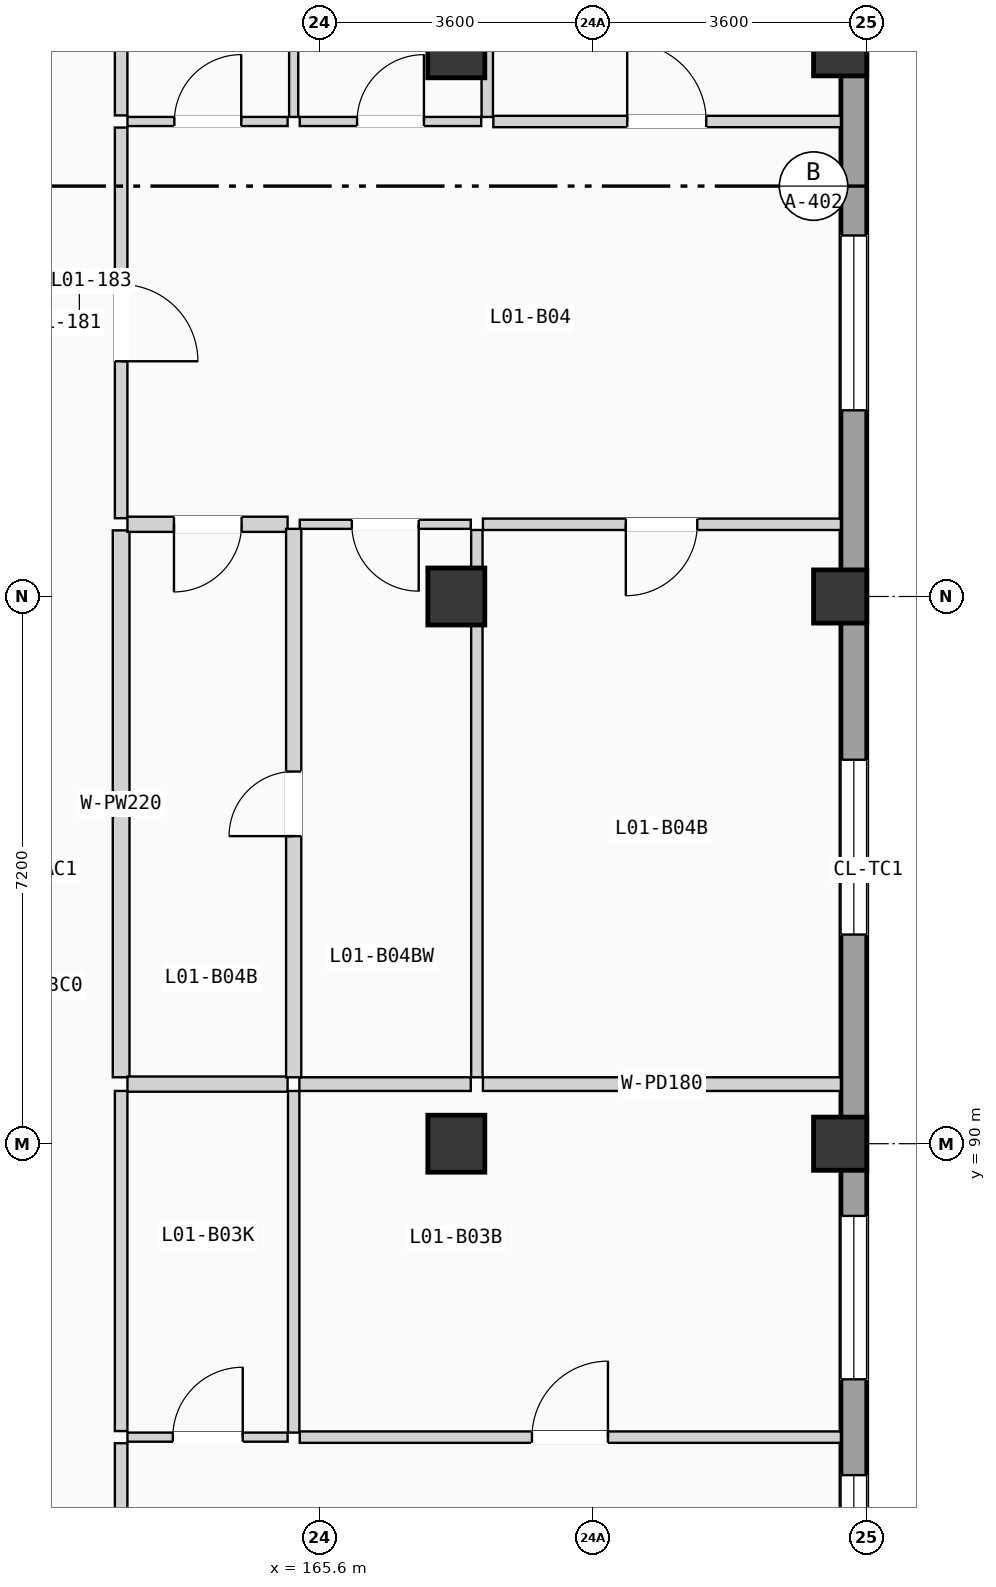
"""IFC4 building model, lengths in metres.
Left out: names, types, materials, properties, quantities, classifications, styles, units other than length and angle.
Written with IfcOpenShell. Run it as: python <this file> out.ifc"""

import sys

from ifc_helpers import new_model, si_unit, direction, frame, frame_2d, origin, origin_2d, place, context, subcontext, project, spatial, rectangle, extrude, element, fill, save


model = new_model("IFC4")
c1 = context("Model", 3, precision=1e-05, world=origin(), true_north=direction((0.0, 1.0)))
c2 = subcontext(c1, "Body", "Model", "MODEL_VIEW")
j1 = project(units=[si_unit("LENGTHUNIT", "METRE"), si_unit("PLANEANGLEUNIT", "RADIAN")], contexts=[c1])
p1 = place(None, origin())
s1 = spatial("IfcSite", under=j1, at=p1, CompositionType="ELEMENT")
p2 = place(p1, origin())
s2 = spatial("IfcBuilding", under=s1, at=p2, CompositionType="ELEMENT")
p3 = place(p2, frame((0.0, 0.0, 4.9)))
s3 = spatial("IfcBuildingStorey", under=s2, at=p3, CompositionType="ELEMENT", Elevation=4.9)
for number, where, z_axis, x_axis in (
    (1, (167.4, 90.0, 0.0), (0.0, 0.0, 1.0), (1.0, 0.0, 0.0)),
    (2, (167.4, 97.2, 0.0), (0.0, 0.0, 1.0), (1.0, 0.0, 0.0)),
    (3, (167.4, 104.4, 0.0), (0.0, 0.0, 1.0), (1.0, 0.0, 0.0)),
):
    element("IfcColumn", number, at=place(p3, frame(where, z_axis=z_axis, x_axis=x_axis)), inside=s3, PredefinedType="COLUMN", context=c2, shape_type="SweptSolid", body=[
        extrude(rectangle(XDim=0.75, YDim=0.75, at=origin_2d()), origin(), (0.0, 0.0, 1.0), 3.675),
    ])
for number, where, z_axis, x_axis in (
    (4, (172.45, 90.0, 0.0), (0.0, 0.0, 1.0), (1.0, 0.0, 0.0)),
    (5, (172.45, 97.2, 0.0), (0.0, 0.0, 1.0), (1.0, 0.0, 0.0)),
    (6, (172.45, 104.4, 0.0), (0.0, 0.0, 1.0), (1.0, 0.0, 0.0)),
):
    element("IfcColumn", number, at=place(p3, frame(where, z_axis=z_axis, x_axis=x_axis)), inside=s3, PredefinedType="COLUMN", context=c2, shape_type="SweptSolid", body=[
        extrude(rectangle(XDim=0.7, YDim=0.7, at=origin_2d()), origin(), (0.0, 0.0, 1.0), 3.675),
    ])
p4 = place(p3, frame((172.63, 68.74, 0.0), z_axis=(0.0, 0.0, 1.0), x_axis=(0.0, 1.0, 0.0)))
e7 = element("IfcWall", 7, at=p4, inside=s3, PredefinedType="SOLIDWALL", context=c2, shape_type="SweptSolid", body=[
    extrude(rectangle(XDim=49.72, YDim=0.34, at=frame_2d((24.86, 0.0))), origin(), (0.0, 0.0, 1.0), 3.415),
])
p5 = place(p4, frame((14.749, 0.0, 0.9)))
e8 = element("IfcOpeningElement", 8, at=p5, cuts=e7, PredefinedType="OPENING", context=c2, shape_type="SweptSolid", body=[
    extrude(rectangle(XDim=2.15, YDim=1.5, at=frame_2d((1.075, 0.75))), frame((0.0, 0.18, 0.0), z_axis=(0.0, -1.0, 0.0), x_axis=(1.0, 0.0, 0.0)), (0.0, 0.0, 1.0), 0.36),
])
p6 = place(p4, frame((8.422, 0.0, 0.9)))
e9 = element("IfcOpeningElement", 9, at=p6, cuts=e7, PredefinedType="OPENING", context=c2, shape_type="SweptSolid", body=[
    extrude(rectangle(XDim=2.15, YDim=1.65, at=frame_2d((1.075, 0.825))), frame((0.0, 0.18, 0.0), z_axis=(0.0, -1.0, 0.0), x_axis=(1.0, 0.0, 0.0)), (0.0, 0.0, 1.0), 0.36),
])
p7 = place(p4, frame((18.16, 0.0, 0.9)))
e10 = element("IfcOpeningElement", 10, at=p7, cuts=e7, PredefinedType="OPENING", context=c2, shape_type="SweptSolid", body=[
    extrude(rectangle(XDim=2.15, YDim=1.8, at=frame_2d((1.075, 0.9))), frame((0.0, 0.18, 0.0), z_axis=(0.0, -1.0, 0.0), x_axis=(1.0, 0.0, 0.0)), (0.0, 0.0, 1.0), 0.36),
])
p8 = place(p4, frame((30.91, 0.0, 0.9)))
e11 = element("IfcOpeningElement", 11, at=p8, cuts=e7, PredefinedType="OPENING", context=c2, shape_type="SweptSolid", body=[
    extrude(rectangle(XDim=2.3, YDim=1.2, at=frame_2d((1.15, 0.6))), frame((0.0, 0.18, 0.0), z_axis=(0.0, -1.0, 0.0), x_axis=(1.0, 0.0, 0.0)), (0.0, 0.0, 1.0), 0.36),
])
p9 = place(p4, frame((24.012, 0.0, 0.9)))
e12 = element("IfcOpeningElement", 12, at=p9, cuts=e7, PredefinedType="OPENING", context=c2, shape_type="SweptSolid", body=[
    extrude(rectangle(XDim=2.3, YDim=1.35, at=frame_2d((1.15, 0.675))), frame((0.0, 0.18, 0.0), z_axis=(0.0, -1.0, 0.0), x_axis=(1.0, 0.0, 0.0)), (0.0, 0.0, 1.0), 0.36),
])
p10 = place(p4, frame((38.045, 0.0, 0.9)))
e13 = element("IfcOpeningElement", 13, at=p10, cuts=e7, PredefinedType="OPENING", context=c2, shape_type="SweptSolid", body=[
    extrude(rectangle(XDim=2.3, YDim=1.5, at=frame_2d((1.15, 0.75))), frame((0.0, 0.18, 0.0), z_axis=(0.0, -1.0, 0.0), x_axis=(1.0, 0.0, 0.0)), (0.0, 0.0, 1.0), 0.36),
])
p11 = place(p3, frame((162.99, 80.635, 0.0), z_axis=(0.0, 0.0, 1.0), x_axis=(0.0, 1.0, 0.0)))
e14 = element("IfcWall", 14, at=p11, inside=s3, PredefinedType="PARTITIONING", context=c2, shape_type="SweptSolid", body=[
    extrude(rectangle(XDim=5.424, YDim=0.165, at=frame_2d((2.712, 0.0))), origin(), (0.0, 0.0, 1.0), 3.395),
])
p12 = place(p11, frame((2.207, 0.0, 0.0)))
e15 = element("IfcOpeningElement", 15, at=p12, cuts=e14, PredefinedType="OPENING", context=c2, shape_type="SweptSolid", body=[
    extrude(rectangle(XDim=1.01, YDim=2.11, at=frame_2d((0.505, 1.055))), frame((0.0, 0.093, 0.0), z_axis=(0.0, -1.0, 0.0), x_axis=(1.0, 0.0, 0.0)), (0.0, 0.0, 1.0), 0.185),
])
p13 = place(p3, frame((162.99, 86.219, 0.0), z_axis=(0.0, 0.0, 1.0), x_axis=(0.0, 1.0, 0.0)))
e16 = element("IfcWall", 16, at=p13, inside=s3, PredefinedType="PARTITIONING", context=c2, shape_type="SweptSolid", body=[
    extrude(rectangle(XDim=4.475, YDim=0.165, at=frame_2d((2.238, 0.0))), origin(), (0.0, 0.0, 1.0), 3.395),
])
p14 = place(p3, frame((162.99, 98.23, 0.0), z_axis=(0.0, 0.0, 1.0), x_axis=(0.0, 1.0, 0.0)))
e17 = element("IfcWall", 17, at=p14, inside=s3, PredefinedType="PARTITIONING", context=c2, shape_type="SweptSolid", body=[
    extrude(rectangle(XDim=5.14, YDim=0.165, at=frame_2d((2.57, 0.0))), origin(), (0.0, 0.0, 1.0), 3.395),
])
p15 = place(p14, frame((2.065, 0.0, 0.0)))
e18 = element("IfcOpeningElement", 18, at=p15, cuts=e17, PredefinedType="OPENING", context=c2, shape_type="SweptSolid", body=[
    extrude(rectangle(XDim=1.01, YDim=2.11, at=frame_2d((0.505, 1.055))), frame((0.0, 0.093, 0.0), z_axis=(0.0, -1.0, 0.0), x_axis=(1.0, 0.0, 0.0)), (0.0, 0.0, 1.0), 0.185),
])
p16 = place(p3, frame((162.99, 90.874, 0.0), z_axis=(0.0, 0.0, 1.0), x_axis=(0.0, 1.0, 0.0)))
e19 = element("IfcWall", 19, at=p16, inside=s3, PredefinedType="PLUMBINGWALL", context=c2, shape_type="SweptSolid", body=[
    extrude(rectangle(XDim=7.196, YDim=0.22, at=frame_2d((3.598, 0.0))), origin(), (0.0, 0.0, 1.0), 3.395),
])
p17 = place(p3, frame((162.99, 103.53, 0.0), z_axis=(0.0, 0.0, 1.0), x_axis=(0.0, 1.0, 0.0)))
e20 = element("IfcWall", 20, at=p17, inside=s3, PredefinedType="PARTITIONING", context=c2, shape_type="SweptSolid", body=[
    extrude(rectangle(XDim=7.67, YDim=0.165, at=frame_2d((3.835, 0.0))), origin(), (0.0, 0.0, 1.0), 3.395),
])
p18 = place(p3, frame((163.073, 86.139, 0.0), z_axis=(0.0, 0.0, 1.0), x_axis=(1.0, 0.0, 0.0)))
e21 = element("IfcWall", 21, at=p18, inside=s3, PredefinedType="PARTITIONING", context=c2, shape_type="SweptSolid", body=[
    extrude(rectangle(XDim=2.107, YDim=0.12, at=frame_2d((1.053, 0.0))), origin(), (0.0, 0.0, 1.0), 3.395),
])
p19 = place(p18, frame((0.597, 0.0, 0.0)))
e22 = element("IfcOpeningElement", 22, at=p19, cuts=e21, PredefinedType="OPENING", context=c2, shape_type="SweptSolid", body=[
    extrude(rectangle(XDim=0.92, YDim=2.02, at=frame_2d((0.46, 1.01))), frame((0.0, 0.07, 0.0), z_axis=(0.0, -1.0, 0.0), x_axis=(1.0, 0.0, 0.0)), (0.0, 0.0, 1.0), 0.14),
])
p20 = place(p3, frame((165.34, 86.139, 0.0), z_axis=(0.0, 0.0, 1.0), x_axis=(1.0, 0.0, 0.0)))
e23 = element("IfcWall", 23, at=p20, inside=s3, PredefinedType="PARTITIONING", context=c2, shape_type="SweptSolid", body=[
    extrude(rectangle(XDim=7.12, YDim=0.15, at=frame_2d((3.56, 0.0))), origin(), (0.0, 0.0, 1.0), 3.395),
])
p21 = place(p20, frame((3.055, 0.0, 0.0)))
e24 = element("IfcOpeningElement", 24, at=p21, cuts=e23, PredefinedType="OPENING", context=c2, shape_type="SweptSolid", body=[
    extrude(rectangle(XDim=1.0, YDim=2.06, at=frame_2d((0.5, 1.03))), frame((0.0, 0.085, 0.0), z_axis=(0.0, -1.0, 0.0), x_axis=(1.0, 0.0, 0.0)), (0.0, 0.0, 1.0), 0.17),
])
p22 = place(p3, frame((165.26, 86.199, 0.0), z_axis=(0.0, 0.0, 1.0), x_axis=(0.0, 1.0, 0.0)))
e25 = element("IfcWall", 25, at=p22, inside=s3, PredefinedType="PARTITIONING", context=c2, shape_type="SweptSolid", body=[
    extrude(rectangle(XDim=4.495, YDim=0.15, at=frame_2d((2.248, 0.0))), origin(), (0.0, 0.0, 1.0), 3.395),
])
p23 = place(p3, frame((163.073, 90.784, 0.0), z_axis=(0.0, 0.0, 1.0), x_axis=(1.0, 0.0, 0.0)))
e26 = element("IfcWall", 26, at=p23, inside=s3, PredefinedType="PLUMBINGWALL", context=c2, shape_type="SweptSolid", body=[
    extrude(rectangle(XDim=2.107, YDim=0.2, at=frame_2d((1.053, 0.0))), origin(), (0.0, 0.0, 1.0), 3.395),
])
p24 = place(p3, frame((167.75, 90.784, 0.0), z_axis=(0.0, 0.0, 1.0), x_axis=(1.0, 0.0, 0.0)))
e27 = element("IfcWall", 27, at=p24, inside=s3, PredefinedType="PARTITIONING", context=c2, shape_type="SweptSolid", body=[
    extrude(rectangle(XDim=4.71, YDim=0.18, at=frame_2d((2.355, 0.0))), origin(), (0.0, 0.0, 1.0), 3.395),
])
p25 = place(p3, frame((165.335, 90.784, 0.0), z_axis=(0.0, 0.0, 1.0), x_axis=(1.0, 0.0, 0.0)))
e28 = element("IfcWall", 28, at=p25, inside=s3, PredefinedType="PARTITIONING", context=c2, shape_type="SweptSolid", body=[
    extrude(rectangle(XDim=2.255, YDim=0.18, at=frame_2d((1.127, 0.0))), origin(), (0.0, 0.0, 1.0), 3.395),
])
p26 = place(p3, frame((163.073, 98.15, 0.0), z_axis=(0.0, 0.0, 1.0), x_axis=(1.0, 0.0, 0.0)))
e29 = element("IfcWall", 29, at=p26, inside=s3, PredefinedType="PLUMBINGWALL", context=c2, shape_type="SweptSolid", body=[
    extrude(rectangle(XDim=2.107, YDim=0.2, at=frame_2d((1.053, 0.0))), origin(), (0.0, 0.0, 1.0), 3.395),
])
p27 = place(p26, frame((0.612, 0.0, 0.0)))
e30 = element("IfcOpeningElement", 30, at=p27, cuts=e29, PredefinedType="OPENING", context=c2, shape_type="SweptSolid", body=[
    extrude(rectangle(XDim=0.89, YDim=2.03, at=frame_2d((0.445, 1.015))), frame((0.0, 0.11, 0.0), z_axis=(0.0, -1.0, 0.0), x_axis=(1.0, 0.0, 0.0)), (0.0, 0.0, 1.0), 0.22),
])
p28 = place(p3, frame((163.073, 103.45, 0.0), z_axis=(0.0, 0.0, 1.0), x_axis=(1.0, 0.0, 0.0)))
e31 = element("IfcWall", 31, at=p28, inside=s3, PredefinedType="PARTITIONING", context=c2, shape_type="SweptSolid", body=[
    extrude(rectangle(XDim=2.107, YDim=0.12, at=frame_2d((1.053, 0.0))), origin(), (0.0, 0.0, 1.0), 3.395),
])
p29 = place(p28, frame((0.617, 0.0, 0.0)))
e32 = element("IfcOpeningElement", 32, at=p29, cuts=e31, PredefinedType="OPENING", context=c2, shape_type="SweptSolid", body=[
    extrude(rectangle(XDim=0.88, YDim=2.02, at=frame_2d((0.44, 1.01))), frame((0.0, 0.07, 0.0), z_axis=(0.0, -1.0, 0.0), x_axis=(1.0, 0.0, 0.0)), (0.0, 0.0, 1.0), 0.14),
])
p30 = place(p3, frame((167.75, 98.15, 0.0), z_axis=(0.0, 0.0, 1.0), x_axis=(1.0, 0.0, 0.0)))
e33 = element("IfcWall", 33, at=p30, inside=s3, PredefinedType="PARTITIONING", context=c2, shape_type="SweptSolid", body=[
    extrude(rectangle(XDim=4.71, YDim=0.15, at=frame_2d((2.355, 0.0))), origin(), (0.0, 0.0, 1.0), 3.395),
])
p31 = place(p30, frame((1.88, 0.0, 0.0)))
e34 = element("IfcOpeningElement", 34, at=p31, cuts=e33, PredefinedType="OPENING", context=c2, shape_type="SweptSolid", body=[
    extrude(rectangle(XDim=0.94, YDim=2.06, at=frame_2d((0.47, 1.03))), frame((0.0, 0.085, 0.0), z_axis=(0.0, -1.0, 0.0), x_axis=(1.0, 0.0, 0.0)), (0.0, 0.0, 1.0), 0.17),
])
p32 = place(p3, frame((165.34, 98.15, 0.0), z_axis=(0.0, 0.0, 1.0), x_axis=(1.0, 0.0, 0.0)))
e35 = element("IfcWall", 35, at=p32, inside=s3, PredefinedType="PARTITIONING", context=c2, shape_type="SweptSolid", body=[
    extrude(rectangle(XDim=2.25, YDim=0.12, at=frame_2d((1.125, 0.0))), origin(), (0.0, 0.0, 1.0), 3.395),
])
p33 = place(p32, frame((0.685, 0.0, 0.0)))
e36 = element("IfcOpeningElement", 36, at=p33, cuts=e35, PredefinedType="OPENING", context=c2, shape_type="SweptSolid", body=[
    extrude(rectangle(XDim=0.88, YDim=2.02, at=frame_2d((0.44, 1.01))), frame((0.0, 0.07, 0.0), z_axis=(0.0, -1.0, 0.0), x_axis=(1.0, 0.0, 0.0)), (0.0, 0.0, 1.0), 0.14),
])
p34 = place(p3, frame((167.887, 103.45, 0.0), z_axis=(0.0, 0.0, 1.0), x_axis=(1.0, 0.0, 0.0)))
e37 = element("IfcWall", 37, at=p34, inside=s3, PredefinedType="PARTITIONING", context=c2, shape_type="SweptSolid", body=[
    extrude(rectangle(XDim=4.573, YDim=0.15, at=frame_2d((2.287, 0.0))), origin(), (0.0, 0.0, 1.0), 3.395),
])
p35 = place(p34, frame((1.761, 0.0, 0.0)))
e38 = element("IfcOpeningElement", 38, at=p35, cuts=e37, PredefinedType="OPENING", context=c2, shape_type="SweptSolid", body=[
    extrude(rectangle(XDim=1.04, YDim=2.08, at=frame_2d((0.52, 1.04))), frame((0.0, 0.085, 0.0), z_axis=(0.0, -1.0, 0.0), x_axis=(1.0, 0.0, 0.0)), (0.0, 0.0, 1.0), 0.17),
])
p36 = place(p3, frame((165.34, 103.45, 0.0), z_axis=(0.0, 0.0, 1.0), x_axis=(1.0, 0.0, 0.0)))
e39 = element("IfcWall", 39, at=p36, inside=s3, PredefinedType="PARTITIONING", context=c2, shape_type="SweptSolid", body=[
    extrude(rectangle(XDim=2.387, YDim=0.12, at=frame_2d((1.193, 0.0))), origin(), (0.0, 0.0, 1.0), 3.395),
])
p37 = place(p36, frame((0.754, 0.0, 0.0)))
e40 = element("IfcOpeningElement", 40, at=p37, cuts=e39, PredefinedType="OPENING", context=c2, shape_type="SweptSolid", body=[
    extrude(rectangle(XDim=0.88, YDim=2.02, at=frame_2d((0.44, 1.01))), frame((0.0, 0.07, 0.0), z_axis=(0.0, -1.0, 0.0), x_axis=(1.0, 0.0, 0.0)), (0.0, 0.0, 1.0), 0.14),
])
p38 = place(p3, frame((165.26, 90.874, 0.0), z_axis=(0.0, 0.0, 1.0), x_axis=(0.0, 1.0, 0.0)))
e41 = element("IfcWall", 41, at=p38, inside=s3, PredefinedType="PLUMBINGWALL", context=c2, shape_type="SweptSolid", body=[
    extrude(rectangle(XDim=7.216, YDim=0.2, at=frame_2d((3.608, 0.0))), origin(), (0.0, 0.0, 1.0), 3.395),
])
p39 = place(p38, frame((3.173, 0.0, 0.0)))
e42 = element("IfcOpeningElement", 42, at=p39, cuts=e41, PredefinedType="OPENING", context=c2, shape_type="SweptSolid", body=[
    extrude(rectangle(XDim=0.85, YDim=2.01, at=frame_2d((0.425, 1.005))), frame((0.0, 0.11, 0.0), z_axis=(0.0, -1.0, 0.0), x_axis=(1.0, 0.0, 0.0)), (0.0, 0.0, 1.0), 0.22),
])
p40 = place(p3, frame((165.26, 103.51, 0.0), z_axis=(0.0, 0.0, 1.0), x_axis=(0.0, 1.0, 0.0)))
e43 = element("IfcWall", 43, at=p40, inside=s3, PredefinedType="PARTITIONING", context=c2, shape_type="SweptSolid", body=[
    extrude(rectangle(XDim=7.69, YDim=0.12, at=frame_2d((3.845, 0.0))), origin(), (0.0, 0.0, 1.0), 3.395),
])
p41 = place(p3, frame((167.67, 90.874, 0.0), z_axis=(0.0, 0.0, 1.0), x_axis=(0.0, 1.0, 0.0)))
e44 = element("IfcWall", 44, at=p41, inside=s3, PredefinedType="PARTITIONING", context=c2, shape_type="SweptSolid", body=[
    extrude(rectangle(XDim=7.201, YDim=0.15, at=frame_2d((3.601, 0.0))), origin(), (0.0, 0.0, 1.0), 3.395),
])
p42 = place(p3, frame((167.807, 103.51, 0.0), z_axis=(0.0, 0.0, 1.0), x_axis=(0.0, 1.0, 0.0)))
e45 = element("IfcWall", 45, at=p42, inside=s3, PredefinedType="PARTITIONING", context=c2, shape_type="SweptSolid", body=[
    extrude(rectangle(XDim=7.69, YDim=0.15, at=frame_2d((3.845, 0.0))), origin(), (0.0, 0.0, 1.0), 3.395),
])
p43 = place(p5, origin())
e46 = element("IfcWindow", 46, at=p43, inside=s3, PartitioningType="DOUBLE_PANEL_VERTICAL", PredefinedType="WINDOW", context=c2, shape_type="SweptSolid", body=[
    extrude(rectangle(XDim=2.15, YDim=1.5, at=frame_2d((1.075, 0.75))), frame((0.0, 0.03, 0.0), z_axis=(0.0, -1.0, 0.0), x_axis=(1.0, 0.0, 0.0)), (0.0, 0.0, 1.0), 0.06),
])
fill(e8, e46)
p44 = place(p7, origin())
e47 = element("IfcWindow", 47, at=p44, inside=s3, PartitioningType="DOUBLE_PANEL_VERTICAL", PredefinedType="WINDOW", context=c2, shape_type="SweptSolid", body=[
    extrude(rectangle(XDim=2.15, YDim=1.8, at=frame_2d((1.075, 0.9))), frame((0.0, 0.03, 0.0), z_axis=(0.0, -1.0, 0.0), x_axis=(1.0, 0.0, 0.0)), (0.0, 0.0, 1.0), 0.06),
])
fill(e10, e47)
p45 = place(p8, origin())
e48 = element("IfcWindow", 48, at=p45, inside=s3, PartitioningType="DOUBLE_PANEL_VERTICAL", PredefinedType="WINDOW", context=c2, shape_type="SweptSolid", body=[
    extrude(rectangle(XDim=2.3, YDim=1.2, at=frame_2d((1.15, 0.6))), frame((0.0, 0.03, 0.0), z_axis=(0.0, -1.0, 0.0), x_axis=(1.0, 0.0, 0.0)), (0.0, 0.0, 1.0), 0.06),
])
fill(e11, e48)
p46 = place(p9, origin())
e49 = element("IfcWindow", 49, at=p46, inside=s3, PartitioningType="DOUBLE_PANEL_VERTICAL", PredefinedType="WINDOW", context=c2, shape_type="SweptSolid", body=[
    extrude(rectangle(XDim=2.3, YDim=1.35, at=frame_2d((1.15, 0.675))), frame((0.0, 0.03, 0.0), z_axis=(0.0, -1.0, 0.0), x_axis=(1.0, 0.0, 0.0)), (0.0, 0.0, 1.0), 0.06),
])
fill(e12, e49)
p47 = place(p15, frame((1.01, 0.0, 0.0), z_axis=(0.0, 0.0, 1.0), x_axis=(-1.0, 0.0, 0.0)))
e50 = element("IfcDoor", 50, at=p47, inside=s3, OperationType="SINGLE_SWING_LEFT", PredefinedType="DOOR", context=c2, shape_type="SweptSolid", body=[
    extrude(rectangle(XDim=1.01, YDim=2.11, at=frame_2d((0.505, 1.055))), frame((0.0, 0.025, 0.0), z_axis=(0.0, -1.0, 0.0), x_axis=(1.0, 0.0, 0.0)), (0.0, 0.0, 1.0), 0.05),
])
fill(e18, e50)
p48 = place(p19, origin())
e51 = element("IfcDoor", 51, at=p48, inside=s3, OperationType="SINGLE_SWING_RIGHT", PredefinedType="DOOR", context=c2, shape_type="SweptSolid", body=[
    extrude(rectangle(XDim=0.92, YDim=2.02, at=frame_2d((0.46, 1.01))), frame((0.0, 0.025, 0.0), z_axis=(0.0, -1.0, 0.0), x_axis=(1.0, 0.0, 0.0)), (0.0, 0.0, 1.0), 0.05),
])
fill(e22, e51)
p49 = place(p21, origin())
e52 = element("IfcDoor", 52, at=p49, inside=s3, OperationType="SINGLE_SWING_RIGHT", PredefinedType="DOOR", context=c2, shape_type="SweptSolid", body=[
    extrude(rectangle(XDim=1.0, YDim=2.06, at=frame_2d((0.5, 1.03))), frame((0.0, 0.025, 0.0), z_axis=(0.0, -1.0, 0.0), x_axis=(1.0, 0.0, 0.0)), (0.0, 0.0, 1.0), 0.05),
])
fill(e24, e52)
p50 = place(p27, frame((0.89, 0.0, 0.0), z_axis=(0.0, 0.0, 1.0), x_axis=(-1.0, 0.0, 0.0)))
e53 = element("IfcDoor", 53, at=p50, inside=s3, OperationType="SINGLE_SWING_LEFT", PredefinedType="DOOR", context=c2, shape_type="SweptSolid", body=[
    extrude(rectangle(XDim=0.89, YDim=2.03, at=frame_2d((0.445, 1.015))), frame((0.0, 0.025, 0.0), z_axis=(0.0, -1.0, 0.0), x_axis=(1.0, 0.0, 0.0)), (0.0, 0.0, 1.0), 0.05),
])
fill(e30, e53)
p51 = place(p29, origin())
e54 = element("IfcDoor", 54, at=p51, inside=s3, OperationType="SINGLE_SWING_RIGHT", PredefinedType="DOOR", context=c2, shape_type="SweptSolid", body=[
    extrude(rectangle(XDim=0.88, YDim=2.02, at=frame_2d((0.44, 1.01))), frame((0.0, 0.025, 0.0), z_axis=(0.0, -1.0, 0.0), x_axis=(1.0, 0.0, 0.0)), (0.0, 0.0, 1.0), 0.05),
])
fill(e32, e54)
p52 = place(p31, frame((0.94, 0.0, 0.0), z_axis=(0.0, 0.0, 1.0), x_axis=(-1.0, 0.0, 0.0)))
e55 = element("IfcDoor", 55, at=p52, inside=s3, OperationType="SINGLE_SWING_LEFT", PredefinedType="DOOR", context=c2, shape_type="SweptSolid", body=[
    extrude(rectangle(XDim=0.94, YDim=2.06, at=frame_2d((0.47, 1.03))), frame((0.0, 0.025, 0.0), z_axis=(0.0, -1.0, 0.0), x_axis=(1.0, 0.0, 0.0)), (0.0, 0.0, 1.0), 0.05),
])
fill(e34, e55)
p53 = place(p33, frame((0.88, 0.0, 0.0), z_axis=(0.0, 0.0, 1.0), x_axis=(-1.0, 0.0, 0.0)))
e56 = element("IfcDoor", 56, at=p53, inside=s3, OperationType="SINGLE_SWING_RIGHT", PredefinedType="DOOR", context=c2, shape_type="SweptSolid", body=[
    extrude(rectangle(XDim=0.88, YDim=2.02, at=frame_2d((0.44, 1.01))), frame((0.0, 0.025, 0.0), z_axis=(0.0, -1.0, 0.0), x_axis=(1.0, 0.0, 0.0)), (0.0, 0.0, 1.0), 0.05),
])
fill(e36, e56)
p54 = place(p35, origin())
e57 = element("IfcDoor", 57, at=p54, inside=s3, OperationType="SINGLE_SWING_LEFT", PredefinedType="DOOR", context=c2, shape_type="SweptSolid", body=[
    extrude(rectangle(XDim=1.04, YDim=2.08, at=frame_2d((0.52, 1.04))), frame((0.0, 0.025, 0.0), z_axis=(0.0, -1.0, 0.0), x_axis=(1.0, 0.0, 0.0)), (0.0, 0.0, 1.0), 0.05),
])
fill(e38, e57)
p55 = place(p37, origin())
e58 = element("IfcDoor", 58, at=p55, inside=s3, OperationType="SINGLE_SWING_RIGHT", PredefinedType="DOOR", context=c2, shape_type="SweptSolid", body=[
    extrude(rectangle(XDim=0.88, YDim=2.02, at=frame_2d((0.44, 1.01))), frame((0.0, 0.025, 0.0), z_axis=(0.0, -1.0, 0.0), x_axis=(1.0, 0.0, 0.0)), (0.0, 0.0, 1.0), 0.05),
])
fill(e40, e58)
p56 = place(p39, origin())
e59 = element("IfcDoor", 59, at=p56, inside=s3, OperationType="SINGLE_SWING_LEFT", PredefinedType="DOOR", context=c2, shape_type="SweptSolid", body=[
    extrude(rectangle(XDim=0.85, YDim=2.01, at=frame_2d((0.425, 1.005))), frame((0.0, 0.025, 0.0), z_axis=(0.0, -1.0, 0.0), x_axis=(1.0, 0.0, 0.0)), (0.0, 0.0, 1.0), 0.05),
])
fill(e42, e59)
save(model, sys.argv[1])
